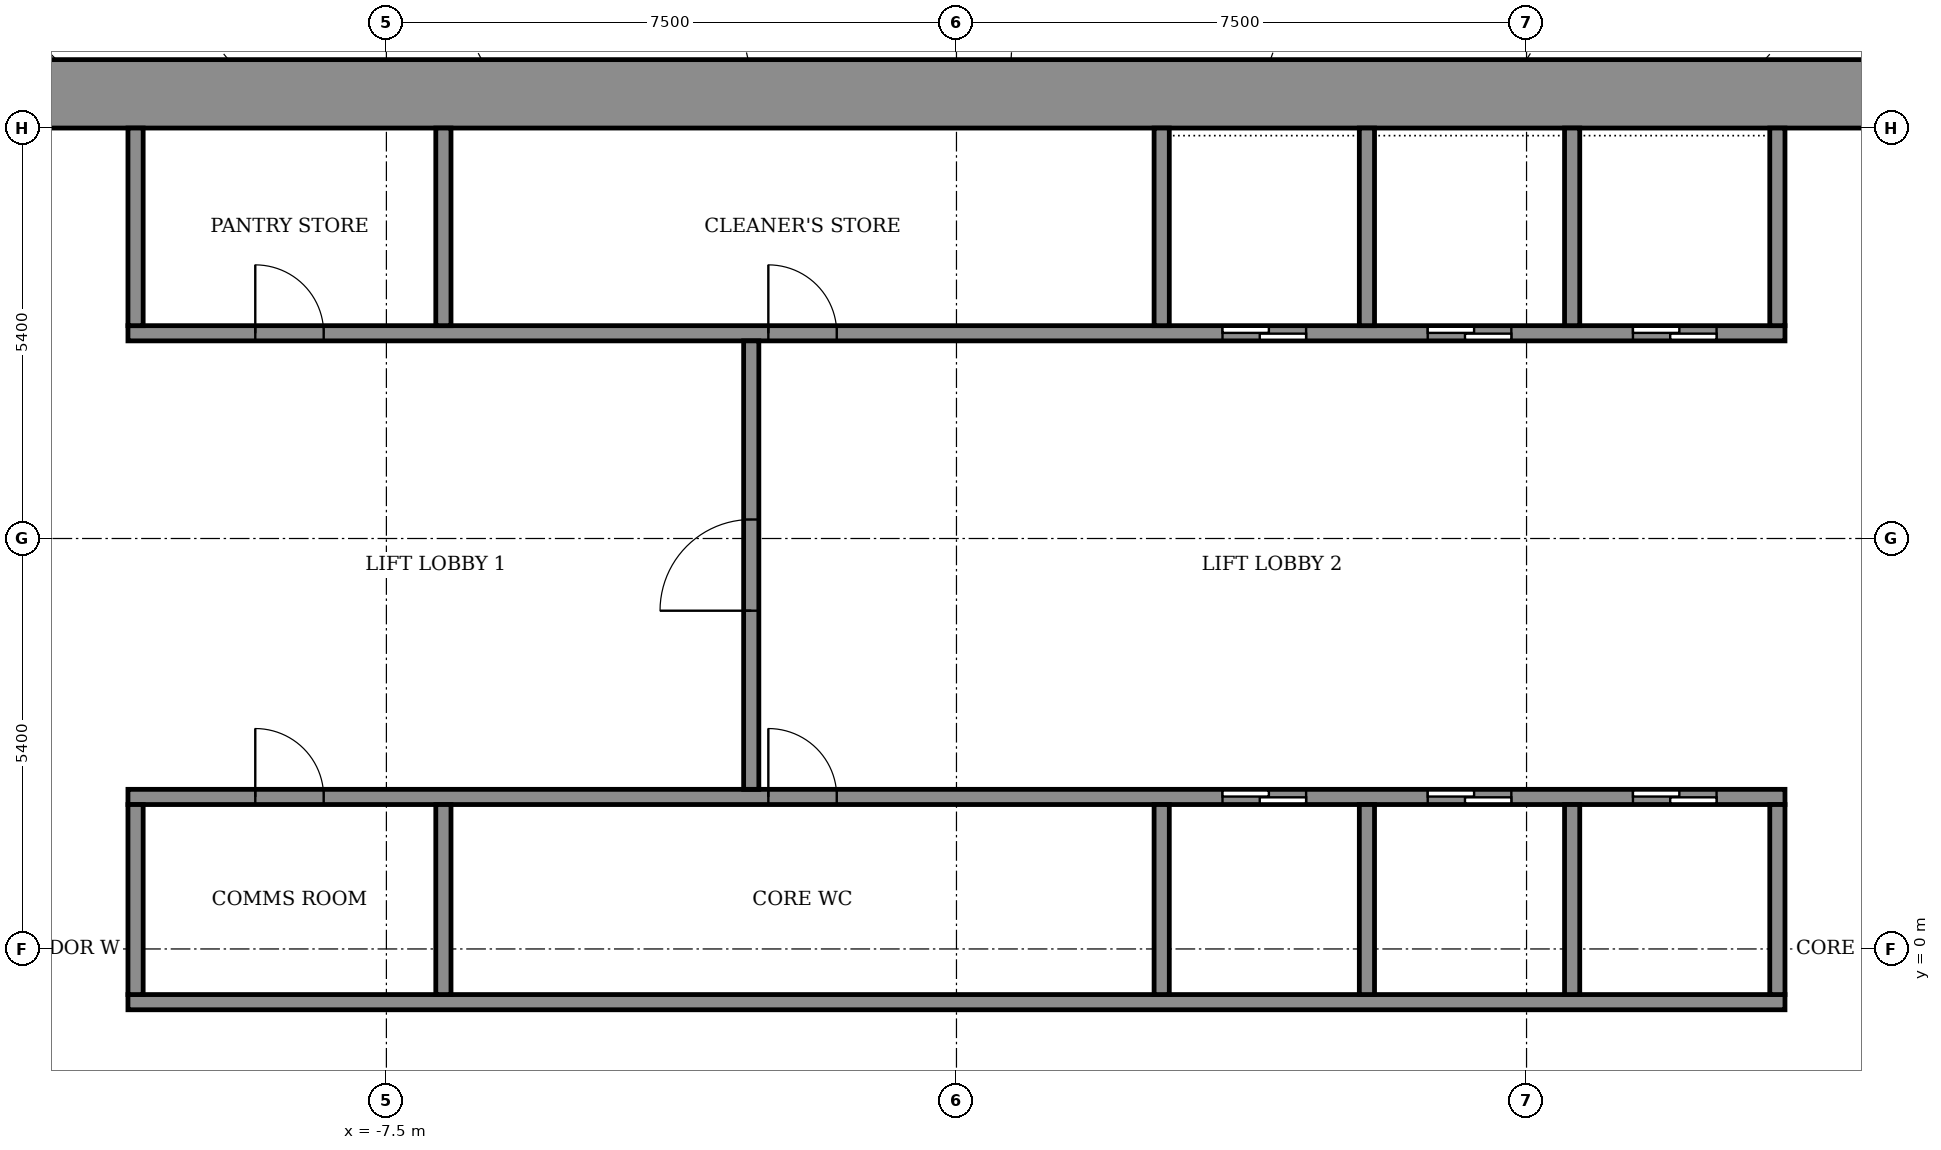
"""IFC4 building model, lengths in metres.
Left out: names, types, materials, properties, quantities, classifications, styles, units other than length and angle.
Written with IfcOpenShell. Run it as: python <this file> out.ifc"""

import sys

from ifc_helpers import new_model, si_unit, direction, frame, frame_2d, origin, place, context, subcontext, project, spatial, rectangle, extrude, element, fill, save


model = new_model("IFC4")
c1 = context("Model", 3, precision=1e-05, world=origin(), true_north=direction((0.0, 1.0)))
c2 = subcontext(c1, "Body", "Model", "MODEL_VIEW")
j1 = project(units=[si_unit("LENGTHUNIT", "METRE"), si_unit("PLANEANGLEUNIT", "RADIAN")], contexts=[c1])
p1 = place(None, origin())
s1 = spatial("IfcSite", under=j1, at=p1, CompositionType="ELEMENT")
p2 = place(p1, origin())
s2 = spatial("IfcBuilding", under=s1, at=p2, CompositionType="ELEMENT")
p3 = place(p2, frame((0.0, 0.0, 170.7)))
s3 = spatial("IfcBuildingStorey", under=s2, at=p3, CompositionType="ELEMENT", Elevation=170.7)
p4 = place(p3, frame((-14.7, 11.25, 0.0), z_axis=(0.0, 0.0, 1.0), x_axis=(1.0, 0.0, 0.0)))
e1 = element("IfcWall", 1, at=p4, inside=s3, PredefinedType="SHEAR", context=c2, shape_type="SweptSolid", body=[
    extrude(rectangle(XDim=29.4, YDim=0.9, at=frame_2d((14.7, 0.0))), origin(), (0.0, 0.0, 1.0), 4.6),
])
p5 = place(p3, frame((-10.9, -0.7, 0.0), z_axis=(0.0, 0.0, 1.0), x_axis=(1.0, 0.0, 0.0)))
e2 = element("IfcWall", 2, at=p5, inside=s3, PredefinedType="SHEAR", context=c2, shape_type="SweptSolid", body=[
    extrude(rectangle(XDim=21.8, YDim=0.2, at=frame_2d((10.9, 0.0))), origin(), (0.0, 0.0, 1.0), 4.05),
])
p6 = place(p3, frame((-10.9, 2.0, 0.0), z_axis=(0.0, 0.0, 1.0), x_axis=(1.0, 0.0, 0.0)))
e3 = element("IfcWall", 3, at=p6, inside=s3, PredefinedType="SHEAR", context=c2, shape_type="SweptSolid", body=[
    extrude(rectangle(XDim=21.8, YDim=0.2, at=frame_2d((10.9, 0.0))), origin(), (0.0, 0.0, 1.0), 4.05),
])
p7 = place(p6, frame((14.4, 0.0, 0.0)))
e4 = element("IfcOpeningElement", 4, at=p7, cuts=e3, PredefinedType="OPENING", context=c2, shape_type="SweptSolid", body=[
    extrude(rectangle(XDim=1.1, YDim=2.1, at=frame_2d((0.55, 1.05))), frame((0.0, 0.11, 0.0), z_axis=(0.0, -1.0, 0.0), x_axis=(1.0, 0.0, 0.0)), (0.0, 0.0, 1.0), 0.22),
])
p8 = place(p6, frame((17.1, 0.0, 0.0)))
e5 = element("IfcOpeningElement", 5, at=p8, cuts=e3, PredefinedType="OPENING", context=c2, shape_type="SweptSolid", body=[
    extrude(rectangle(XDim=1.1, YDim=2.1, at=frame_2d((0.55, 1.05))), frame((0.0, 0.11, 0.0), z_axis=(0.0, -1.0, 0.0), x_axis=(1.0, 0.0, 0.0)), (0.0, 0.0, 1.0), 0.22),
])
p9 = place(p6, frame((19.8, 0.0, 0.0)))
e6 = element("IfcOpeningElement", 6, at=p9, cuts=e3, PredefinedType="OPENING", context=c2, shape_type="SweptSolid", body=[
    extrude(rectangle(XDim=1.1, YDim=2.1, at=frame_2d((0.55, 1.05))), frame((0.0, 0.11, 0.0), z_axis=(0.0, -1.0, 0.0), x_axis=(1.0, 0.0, 0.0)), (0.0, 0.0, 1.0), 0.22),
])
p10 = place(p6, frame((1.675, 0.0, 0.0)))
e7 = element("IfcOpeningElement", 7, at=p10, cuts=e3, PredefinedType="OPENING", context=c2, shape_type="SweptSolid", body=[
    extrude(rectangle(XDim=0.9, YDim=2.1, at=frame_2d((0.45, 1.05))), frame((0.0, 0.11, 0.0), z_axis=(0.0, -1.0, 0.0), x_axis=(1.0, 0.0, 0.0)), (0.0, 0.0, 1.0), 0.22),
])
p11 = place(p6, frame((8.425, 0.0, 0.0)))
e8 = element("IfcOpeningElement", 8, at=p11, cuts=e3, PredefinedType="OPENING", context=c2, shape_type="SweptSolid", body=[
    extrude(rectangle(XDim=0.9, YDim=2.1, at=frame_2d((0.45, 1.05))), frame((0.0, 0.11, 0.0), z_axis=(0.0, -1.0, 0.0), x_axis=(1.0, 0.0, 0.0)), (0.0, 0.0, 1.0), 0.22),
])
p12 = place(p3, frame((-10.9, 8.1, 0.0), z_axis=(0.0, 0.0, 1.0), x_axis=(1.0, 0.0, 0.0)))
e9 = element("IfcWall", 9, at=p12, inside=s3, PredefinedType="SHEAR", context=c2, shape_type="SweptSolid", body=[
    extrude(rectangle(XDim=21.8, YDim=0.2, at=frame_2d((10.9, 0.0))), origin(), (0.0, 0.0, 1.0), 4.05),
])
p13 = place(p12, frame((14.4, 0.0, 0.0)))
e10 = element("IfcOpeningElement", 10, at=p13, cuts=e9, PredefinedType="OPENING", context=c2, shape_type="SweptSolid", body=[
    extrude(rectangle(XDim=1.1, YDim=2.1, at=frame_2d((0.55, 1.05))), frame((0.0, 0.11, 0.0), z_axis=(0.0, -1.0, 0.0), x_axis=(1.0, 0.0, 0.0)), (0.0, 0.0, 1.0), 0.22),
])
p14 = place(p12, frame((17.1, 0.0, 0.0)))
e11 = element("IfcOpeningElement", 11, at=p14, cuts=e9, PredefinedType="OPENING", context=c2, shape_type="SweptSolid", body=[
    extrude(rectangle(XDim=1.1, YDim=2.1, at=frame_2d((0.55, 1.05))), frame((0.0, 0.11, 0.0), z_axis=(0.0, -1.0, 0.0), x_axis=(1.0, 0.0, 0.0)), (0.0, 0.0, 1.0), 0.22),
])
p15 = place(p12, frame((19.8, 0.0, 0.0)))
e12 = element("IfcOpeningElement", 12, at=p15, cuts=e9, PredefinedType="OPENING", context=c2, shape_type="SweptSolid", body=[
    extrude(rectangle(XDim=1.1, YDim=2.1, at=frame_2d((0.55, 1.05))), frame((0.0, 0.11, 0.0), z_axis=(0.0, -1.0, 0.0), x_axis=(1.0, 0.0, 0.0)), (0.0, 0.0, 1.0), 0.22),
])
p16 = place(p12, frame((1.675, 0.0, 0.0)))
e13 = element("IfcOpeningElement", 13, at=p16, cuts=e9, PredefinedType="OPENING", context=c2, shape_type="SweptSolid", body=[
    extrude(rectangle(XDim=0.9, YDim=2.1, at=frame_2d((0.45, 1.05))), frame((0.0, 0.11, 0.0), z_axis=(0.0, -1.0, 0.0), x_axis=(1.0, 0.0, 0.0)), (0.0, 0.0, 1.0), 0.22),
])
p17 = place(p12, frame((8.425, 0.0, 0.0)))
e14 = element("IfcOpeningElement", 14, at=p17, cuts=e9, PredefinedType="OPENING", context=c2, shape_type="SweptSolid", body=[
    extrude(rectangle(XDim=0.9, YDim=2.1, at=frame_2d((0.45, 1.05))), frame((0.0, 0.11, 0.0), z_axis=(0.0, -1.0, 0.0), x_axis=(1.0, 0.0, 0.0)), (0.0, 0.0, 1.0), 0.22),
])
for number, where, z_axis, x_axis in (
    (15, (-10.8, -0.6, 0.0), (0.0, 0.0, 1.0), (0.0, 1.0, 0.0)),
    (16, (-6.75, -0.6, 0.0), (0.0, 0.0, 1.0), (0.0, 1.0, 0.0)),
):
    element("IfcWall", number, at=place(p3, frame(where, z_axis=z_axis, x_axis=x_axis)), inside=s3, PredefinedType="STANDARD", context=c2, shape_type="SweptSolid", body=[
        extrude(rectangle(XDim=2.5, YDim=0.2, at=frame_2d((1.25, 0.0))), origin(), (0.0, 0.0, 1.0), 4.05),
    ])
for number, where, z_axis, x_axis in (
    (17, (2.7, -0.6, 0.0), (0.0, 0.0, 1.0), (0.0, 1.0, 0.0)),
    (18, (5.4, -0.6, 0.0), (0.0, 0.0, 1.0), (0.0, 1.0, 0.0)),
    (19, (8.1, -0.6, 0.0), (0.0, 0.0, 1.0), (0.0, 1.0, 0.0)),
    (20, (10.8, -0.6, 0.0), (0.0, 0.0, 1.0), (0.0, 1.0, 0.0)),
):
    element("IfcWall", number, at=place(p3, frame(where, z_axis=z_axis, x_axis=x_axis)), inside=s3, PredefinedType="SHEAR", context=c2, shape_type="SweptSolid", body=[
        extrude(rectangle(XDim=2.5, YDim=0.2, at=frame_2d((1.25, 0.0))), origin(), (0.0, 0.0, 1.0), 4.05),
    ])
for number, where, z_axis, x_axis in (
    (21, (-10.8, 8.2, 0.0), (0.0, 0.0, 1.0), (0.0, 1.0, 0.0)),
    (22, (-6.75, 8.2, 0.0), (0.0, 0.0, 1.0), (0.0, 1.0, 0.0)),
):
    element("IfcWall", number, at=place(p3, frame(where, z_axis=z_axis, x_axis=x_axis)), inside=s3, PredefinedType="STANDARD", context=c2, shape_type="SweptSolid", body=[
        extrude(rectangle(XDim=2.6, YDim=0.2, at=frame_2d((1.3, 0.0))), origin(), (0.0, 0.0, 1.0), 4.05),
    ])
for number, where, z_axis, x_axis in (
    (23, (2.7, 8.2, 0.0), (0.0, 0.0, 1.0), (0.0, 1.0, 0.0)),
    (24, (5.4, 8.2, 0.0), (0.0, 0.0, 1.0), (0.0, 1.0, 0.0)),
    (25, (8.1, 8.2, 0.0), (0.0, 0.0, 1.0), (0.0, 1.0, 0.0)),
    (26, (10.8, 8.2, 0.0), (0.0, 0.0, 1.0), (0.0, 1.0, 0.0)),
):
    element("IfcWall", number, at=place(p3, frame(where, z_axis=z_axis, x_axis=x_axis)), inside=s3, PredefinedType="SHEAR", context=c2, shape_type="SweptSolid", body=[
        extrude(rectangle(XDim=2.6, YDim=0.2, at=frame_2d((1.3, 0.0))), origin(), (0.0, 0.0, 1.0), 4.05),
    ])
p18 = place(p3, frame((-2.7, 2.1, 0.0), z_axis=(0.0, 0.0, 1.0), x_axis=(0.0, 1.0, 0.0)))
e27 = element("IfcWall", 27, at=p18, inside=s3, PredefinedType="STANDARD", context=c2, shape_type="SweptSolid", body=[
    extrude(rectangle(XDim=5.9, YDim=0.2, at=frame_2d((2.95, 0.0))), origin(), (0.0, 0.0, 1.0), 4.05),
])
p19 = place(p18, frame((2.35, 0.0, 0.0)))
e28 = element("IfcOpeningElement", 28, at=p19, cuts=e27, PredefinedType="OPENING", context=c2, shape_type="SweptSolid", body=[
    extrude(rectangle(XDim=1.2, YDim=2.1, at=frame_2d((0.6, 1.05))), frame((0.0, 0.11, 0.0), z_axis=(0.0, -1.0, 0.0), x_axis=(1.0, 0.0, 0.0)), (0.0, 0.0, 1.0), 0.22),
])
p20 = place(p7, origin())
e29 = element("IfcDoor", 29, at=p20, inside=s3, OperationType="SLIDING_TO_LEFT", PredefinedType="DOOR", context=c2, shape_type="SweptSolid", body=[
    extrude(rectangle(XDim=1.1, YDim=2.1, at=frame_2d((0.55, 1.05))), frame((0.0, 0.025, 0.0), z_axis=(0.0, -1.0, 0.0), x_axis=(1.0, 0.0, 0.0)), (0.0, 0.0, 1.0), 0.05),
])
fill(e4, e29)
p21 = place(p8, origin())
e30 = element("IfcDoor", 30, at=p21, inside=s3, OperationType="SLIDING_TO_LEFT", PredefinedType="DOOR", context=c2, shape_type="SweptSolid", body=[
    extrude(rectangle(XDim=1.1, YDim=2.1, at=frame_2d((0.55, 1.05))), frame((0.0, 0.025, 0.0), z_axis=(0.0, -1.0, 0.0), x_axis=(1.0, 0.0, 0.0)), (0.0, 0.0, 1.0), 0.05),
])
fill(e5, e30)
p22 = place(p9, origin())
e31 = element("IfcDoor", 31, at=p22, inside=s3, OperationType="SLIDING_TO_LEFT", PredefinedType="DOOR", context=c2, shape_type="SweptSolid", body=[
    extrude(rectangle(XDim=1.1, YDim=2.1, at=frame_2d((0.55, 1.05))), frame((0.0, 0.025, 0.0), z_axis=(0.0, -1.0, 0.0), x_axis=(1.0, 0.0, 0.0)), (0.0, 0.0, 1.0), 0.05),
])
fill(e6, e31)
p23 = place(p13, origin())
e32 = element("IfcDoor", 32, at=p23, inside=s3, OperationType="SLIDING_TO_LEFT", PredefinedType="DOOR", context=c2, shape_type="SweptSolid", body=[
    extrude(rectangle(XDim=1.1, YDim=2.1, at=frame_2d((0.55, 1.05))), frame((0.0, 0.025, 0.0), z_axis=(0.0, -1.0, 0.0), x_axis=(1.0, 0.0, 0.0)), (0.0, 0.0, 1.0), 0.05),
])
fill(e10, e32)
p24 = place(p14, origin())
e33 = element("IfcDoor", 33, at=p24, inside=s3, OperationType="SLIDING_TO_LEFT", PredefinedType="DOOR", context=c2, shape_type="SweptSolid", body=[
    extrude(rectangle(XDim=1.1, YDim=2.1, at=frame_2d((0.55, 1.05))), frame((0.0, 0.025, 0.0), z_axis=(0.0, -1.0, 0.0), x_axis=(1.0, 0.0, 0.0)), (0.0, 0.0, 1.0), 0.05),
])
fill(e11, e33)
p25 = place(p15, origin())
e34 = element("IfcDoor", 34, at=p25, inside=s3, OperationType="SLIDING_TO_LEFT", PredefinedType="DOOR", context=c2, shape_type="SweptSolid", body=[
    extrude(rectangle(XDim=1.1, YDim=2.1, at=frame_2d((0.55, 1.05))), frame((0.0, 0.025, 0.0), z_axis=(0.0, -1.0, 0.0), x_axis=(1.0, 0.0, 0.0)), (0.0, 0.0, 1.0), 0.05),
])
fill(e12, e34)
p26 = place(p10, origin())
e35 = element("IfcDoor", 35, at=p26, inside=s3, OperationType="SINGLE_SWING_LEFT", PredefinedType="DOOR", context=c2, shape_type="SweptSolid", body=[
    extrude(rectangle(XDim=0.9, YDim=2.1, at=frame_2d((0.45, 1.05))), frame((0.0, 0.025, 0.0), z_axis=(0.0, -1.0, 0.0), x_axis=(1.0, 0.0, 0.0)), (0.0, 0.0, 1.0), 0.05),
])
fill(e7, e35)
p27 = place(p11, origin())
e36 = element("IfcDoor", 36, at=p27, inside=s3, OperationType="SINGLE_SWING_RIGHT", PredefinedType="DOOR", context=c2, shape_type="SweptSolid", body=[
    extrude(rectangle(XDim=0.9, YDim=2.1, at=frame_2d((0.45, 1.05))), frame((0.0, 0.025, 0.0), z_axis=(0.0, -1.0, 0.0), x_axis=(1.0, 0.0, 0.0)), (0.0, 0.0, 1.0), 0.05),
])
fill(e8, e36)
p28 = place(p16, origin())
e37 = element("IfcDoor", 37, at=p28, inside=s3, OperationType="SINGLE_SWING_RIGHT", PredefinedType="DOOR", context=c2, shape_type="SweptSolid", body=[
    extrude(rectangle(XDim=0.9, YDim=2.1, at=frame_2d((0.45, 1.05))), frame((0.0, 0.025, 0.0), z_axis=(0.0, -1.0, 0.0), x_axis=(1.0, 0.0, 0.0)), (0.0, 0.0, 1.0), 0.05),
])
fill(e13, e37)
p29 = place(p17, origin())
e38 = element("IfcDoor", 38, at=p29, inside=s3, OperationType="SINGLE_SWING_RIGHT", PredefinedType="DOOR", context=c2, shape_type="SweptSolid", body=[
    extrude(rectangle(XDim=0.9, YDim=2.1, at=frame_2d((0.45, 1.05))), frame((0.0, 0.025, 0.0), z_axis=(0.0, -1.0, 0.0), x_axis=(1.0, 0.0, 0.0)), (0.0, 0.0, 1.0), 0.05),
])
fill(e14, e38)
p30 = place(p19, origin())
e39 = element("IfcDoor", 39, at=p30, inside=s3, OperationType="SINGLE_SWING_LEFT", PredefinedType="DOOR", context=c2, shape_type="SweptSolid", body=[
    extrude(rectangle(XDim=1.2, YDim=2.1, at=frame_2d((0.6, 1.05))), frame((0.0, 0.025, 0.0), z_axis=(0.0, -1.0, 0.0), x_axis=(1.0, 0.0, 0.0)), (0.0, 0.0, 1.0), 0.05),
])
fill(e28, e39)
save(model, sys.argv[1])
